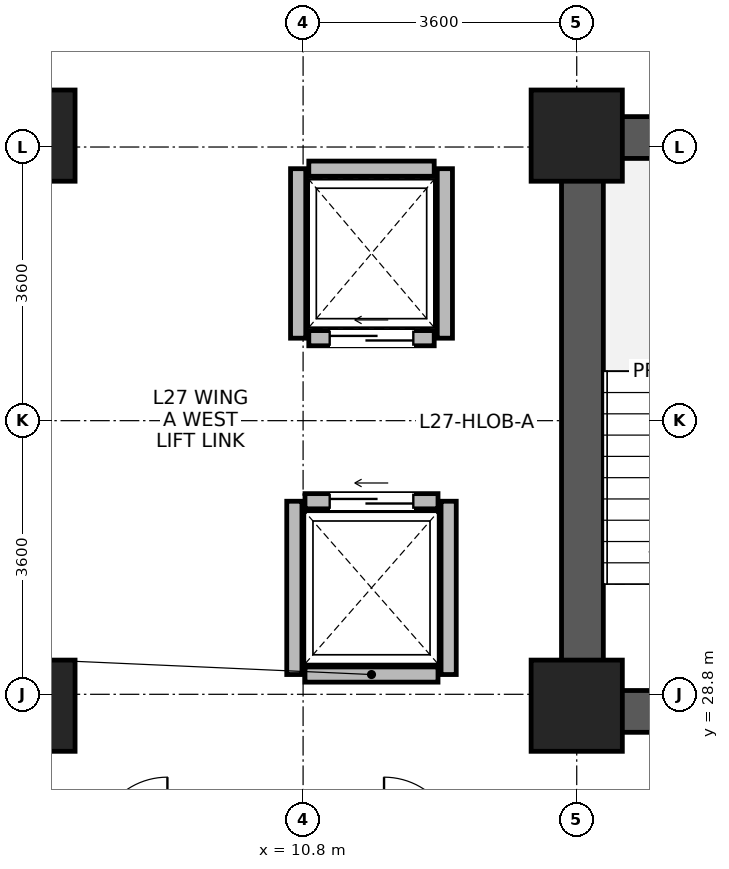
"""IFC4 building model, lengths in metres.
Left out: names, types, materials, properties, quantities, classifications, styles, units other than length and angle.
Written with IfcOpenShell. Run it as: python <this file> out.ifc"""

import sys

from ifc_helpers import new_model, si_unit, direction, frame, frame_2d, origin, origin_2d, place, context, subcontext, project, spatial, rectangle, extrude, source, transform, mapped, element, fill, save


model = new_model("IFC4")
c1 = context("Model", 3, precision=1e-05, world=origin(), true_north=direction((0.0, 1.0)))
c2 = subcontext(c1, "Body", "Model", "MODEL_VIEW")
j1 = project(units=[si_unit("LENGTHUNIT", "METRE"), si_unit("PLANEANGLEUNIT", "RADIAN")], contexts=[c1])
p1 = place(None, origin())
s1 = spatial("IfcSite", under=j1, at=p1, CompositionType="ELEMENT")
p2 = place(p1, origin())
s2 = spatial("IfcBuilding", under=s1, at=p2, CompositionType="ELEMENT")
p3 = place(p2, frame((0.0, 0.0, 108.2)))
s3 = spatial("IfcBuildingStorey", under=s2, at=p3, CompositionType="ELEMENT", Elevation=108.2)
p4 = place(p3, frame((14.475, 28.3, 0.0), z_axis=(0.0, 0.0, 1.0), x_axis=(0.0, 1.0, 0.0)))
e1 = element("IfcWall", 1, at=p4, inside=s3, PredefinedType="SHEAR", context=c2, shape_type="SweptSolid", body=[
    extrude(rectangle(XDim=8.1, YDim=0.55, at=frame_2d((4.05, 0.0))), origin(), (0.0, 0.0, 1.0), 3.45),
])
for number, where, z_axis, x_axis in (
    (2, (14.75, 28.575, 0.0), (0.0, 0.0, 1.0), (1.0, 0.0, 0.0)),
    (3, (14.75, 36.125, 0.0), (0.0, 0.0, 1.0), (1.0, 0.0, 0.0)),
):
    element("IfcWall", number, at=place(p3, frame(where, z_axis=z_axis, x_axis=x_axis)), inside=s3, PredefinedType="SHEAR", context=c2, shape_type="SweptSolid", body=[
        extrude(rectangle(XDim=3.2, YDim=0.55, at=frame_2d((1.6, 0.0))), origin(), (0.0, 0.0, 1.0), 3.45),
    ])
m1 = source(origin(), c2, "Body", "SweptSolid", [
    extrude(rectangle(XDim=1.2, YDim=1.2, at=origin_2d()), origin(), (0.0, 0.0, 1.0), 3.7),
])
for number, where, z_axis, x_axis in (
    (4, (7.2, 28.65, 0.0), (0.0, 0.0, 1.0), (1.0, 0.0, 0.0)),
    (5, (7.2, 36.15, 0.0), (0.0, 0.0, 1.0), (1.0, 0.0, 0.0)),
    (6, (14.4, 28.65, 0.0), (0.0, 0.0, 1.0), (1.0, 0.0, 0.0)),
    (7, (14.4, 36.15, 0.0), (0.0, 0.0, 1.0), (1.0, 0.0, 0.0)),
):
    element("IfcColumn", number, at=place(p3, frame(where, z_axis=z_axis, x_axis=x_axis)), inside=s3, PredefinedType="COLUMN", context=c2, shape_type="MappedRepresentation", body=[
        mapped(m1, transform((0.0, 0.0, 0.0), x_axis=(1.0, 0.0, 0.0), y_axis=(0.0, 1.0, 0.0), z_axis=(0.0, 0.0, 1.0), scale=1.0)),
    ])
p5 = place(p3, frame((10.825, 29.06, 0.0), z_axis=(0.0, 0.0, 1.0), x_axis=(1.0, 0.0, 0.0)))
e8 = element("IfcWall", 8, at=p5, inside=s3, PredefinedType="PARTITIONING", context=c2, shape_type="SweptSolid", body=[
    extrude(rectangle(XDim=1.75, YDim=0.2, at=frame_2d((0.875, 0.0))), origin(), (0.0, 0.0, 1.0), 3.43),
])
p6 = place(p3, frame((10.825, 31.34, 0.0), z_axis=(0.0, 0.0, 1.0), x_axis=(1.0, 0.0, 0.0)))
e9 = element("IfcWall", 9, at=p6, inside=s3, PredefinedType="PARTITIONING", context=c2, shape_type="SweptSolid", body=[
    extrude(rectangle(XDim=1.75, YDim=0.2, at=frame_2d((0.875, 0.0))), origin(), (0.0, 0.0, 1.0), 3.43),
])
p7 = place(p6, frame((0.325, 0.0, 0.0)))
e10 = element("IfcOpeningElement", 10, at=p7, cuts=e9, PredefinedType="OPENING", context=c2, shape_type="SweptSolid", body=[
    extrude(rectangle(XDim=1.1, YDim=2.12, at=frame_2d((0.55, 1.06))), frame((0.0, 0.11, 0.0), z_axis=(0.0, -1.0, 0.0), x_axis=(1.0, 0.0, 0.0)), (0.0, 0.0, 1.0), 0.22),
])
for number, where, z_axis, x_axis in (
    (11, (10.685, 29.06, 0.0), (0.0, 0.0, 1.0), (0.0, 1.0, 0.0)),
    (12, (12.715, 29.06, 0.0), (0.0, 0.0, 1.0), (0.0, 1.0, 0.0)),
):
    element("IfcWall", number, at=place(p3, frame(where, z_axis=z_axis, x_axis=x_axis)), inside=s3, PredefinedType="PARTITIONING", context=c2, shape_type="SweptSolid", body=[
        extrude(rectangle(XDim=2.28, YDim=0.2, at=frame_2d((1.14, 0.0))), origin(), (0.0, 0.0, 1.0), 3.43),
    ])
p8 = place(p3, frame((10.875, 33.485, 0.0), z_axis=(0.0, 0.0, 1.0), x_axis=(1.0, 0.0, 0.0)))
e13 = element("IfcWall", 13, at=p8, inside=s3, PredefinedType="PARTITIONING", context=c2, shape_type="SweptSolid", body=[
    extrude(rectangle(XDim=1.65, YDim=0.2, at=frame_2d((0.825, 0.0))), origin(), (0.0, 0.0, 1.0), 3.43),
])
p9 = place(p8, frame((0.275, 0.0, 0.0)))
e14 = element("IfcOpeningElement", 14, at=p9, cuts=e13, PredefinedType="OPENING", context=c2, shape_type="SweptSolid", body=[
    extrude(rectangle(XDim=1.1, YDim=2.12, at=frame_2d((0.55, 1.06))), frame((0.0, 0.11, 0.0), z_axis=(0.0, -1.0, 0.0), x_axis=(1.0, 0.0, 0.0)), (0.0, 0.0, 1.0), 0.22),
])
p10 = place(p3, frame((10.875, 35.715, 0.0), z_axis=(0.0, 0.0, 1.0), x_axis=(1.0, 0.0, 0.0)))
e15 = element("IfcWall", 15, at=p10, inside=s3, PredefinedType="PARTITIONING", context=c2, shape_type="SweptSolid", body=[
    extrude(rectangle(XDim=1.65, YDim=0.2, at=frame_2d((0.825, 0.0))), origin(), (0.0, 0.0, 1.0), 3.43),
])
for number, where, z_axis, x_axis in (
    (16, (10.735, 33.485, 0.0), (0.0, 0.0, 1.0), (0.0, 1.0, 0.0)),
    (17, (12.665, 33.485, 0.0), (0.0, 0.0, 1.0), (0.0, 1.0, 0.0)),
):
    element("IfcWall", number, at=place(p3, frame(where, z_axis=z_axis, x_axis=x_axis)), inside=s3, PredefinedType="PARTITIONING", context=c2, shape_type="SweptSolid", body=[
        extrude(rectangle(XDim=2.23, YDim=0.2, at=frame_2d((1.115, 0.0))), origin(), (0.0, 0.0, 1.0), 3.43),
    ])
p11 = place(p7, origin())
e18 = element("IfcDoor", 18, at=p11, inside=s3, OperationType="SLIDING_TO_LEFT", PredefinedType="DOOR", context=c2, shape_type="SweptSolid", body=[
    extrude(rectangle(XDim=1.1, YDim=2.12, at=frame_2d((0.55, 1.06))), frame((0.0, 0.025, 0.0), z_axis=(0.0, -1.0, 0.0), x_axis=(1.0, 0.0, 0.0)), (0.0, 0.0, 1.0), 0.05),
])
fill(e10, e18)
p12 = place(p9, origin())
e19 = element("IfcDoor", 19, at=p12, inside=s3, OperationType="SLIDING_TO_LEFT", PredefinedType="DOOR", context=c2, shape_type="SweptSolid", body=[
    extrude(rectangle(XDim=1.1, YDim=2.12, at=frame_2d((0.55, 1.06))), frame((0.0, 0.025, 0.0), z_axis=(0.0, -1.0, 0.0), x_axis=(1.0, 0.0, 0.0)), (0.0, 0.0, 1.0), 0.05),
])
fill(e14, e19)
save(model, sys.argv[1])
